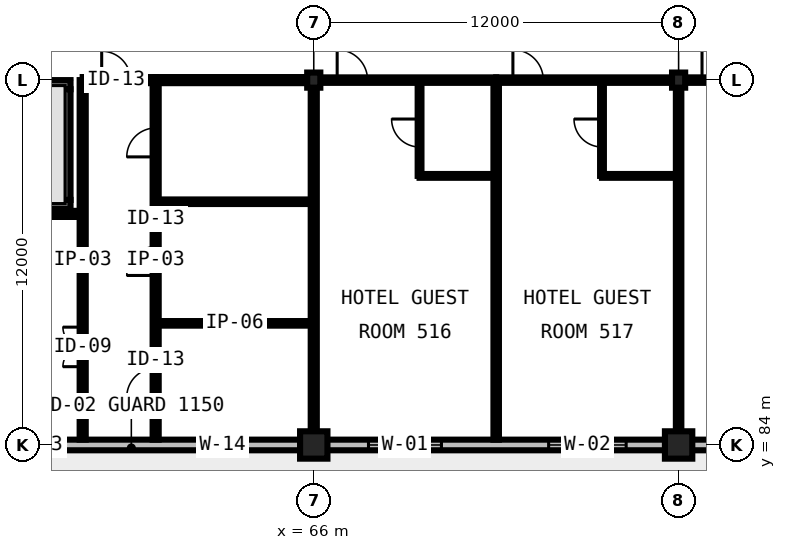
"""IFC4 building model, lengths in metres.
Left out: names, types, materials, properties, quantities, classifications, styles, units other than length and angle.
Written with IfcOpenShell. Run it as: python <this file> out.ifc"""

import sys

from ifc_helpers import new_model, si_unit, direction, frame, frame_2d, origin, origin_2d, place, context, subcontext, project, spatial, rectangle, i_section, extrude, element, fill, save


model = new_model("IFC4")
c1 = context("Model", 3, precision=1e-05, world=origin(), true_north=direction((0.0, 1.0)))
c2 = subcontext(c1, "Body", "Model", "MODEL_VIEW")
j1 = project(units=[si_unit("LENGTHUNIT", "METRE"), si_unit("PLANEANGLEUNIT", "RADIAN")], contexts=[c1])
p1 = place(None, origin())
s1 = spatial("IfcSite", under=j1, at=p1, CompositionType="ELEMENT")
p2 = place(p1, origin())
s2 = spatial("IfcBuilding", under=s1, at=p2, CompositionType="ELEMENT")
p3 = place(p2, frame((0.0, 0.0, 27.6)))
s3 = spatial("IfcBuildingStorey", under=s2, at=p3, CompositionType="ELEMENT", Elevation=27.6)
p4 = place(p3, frame((66.0, 84.0, 0.0), z_axis=(0.0, 0.0, 1.0), x_axis=(1.0, 0.0, 0.0)))
e1 = element("IfcColumn", 1, at=p4, inside=s3, PredefinedType="COLUMN", context=c2, shape_type="SweptSolid", body=[
    extrude(rectangle(XDim=0.9, YDim=0.9, at=origin_2d()), origin(), (0.0, 0.0, 1.0), 3.6),
])
p5 = place(p3, frame((66.0, 96.0, 0.0), z_axis=(0.0, 0.0, 1.0), x_axis=(1.0, 0.0, 0.0)))
e2 = element("IfcColumn", 2, at=p5, inside=s3, PredefinedType="COLUMN", context=c2, shape_type="SweptSolid", body=[
    extrude(i_section(OverallWidth=0.432, OverallDepth=0.498, WebThickness=0.056, FlangeThickness=0.089, FilletRadius=0.031, at=origin_2d()), origin(), (0.0, 0.0, 1.0), 3.6),
])
p6 = place(p3, frame((78.0, 84.0, 0.0), z_axis=(0.0, 0.0, 1.0), x_axis=(1.0, 0.0, 0.0)))
e3 = element("IfcColumn", 3, at=p6, inside=s3, PredefinedType="COLUMN", context=c2, shape_type="SweptSolid", body=[
    extrude(rectangle(XDim=0.9, YDim=0.9, at=origin_2d()), origin(), (0.0, 0.0, 1.0), 3.6),
])
p7 = place(p3, frame((78.0, 96.0, 0.0), z_axis=(0.0, 0.0, 1.0), x_axis=(1.0, 0.0, 0.0)))
e4 = element("IfcColumn", 4, at=p7, inside=s3, PredefinedType="COLUMN", context=c2, shape_type="SweptSolid", body=[
    extrude(i_section(OverallWidth=0.432, OverallDepth=0.498, WebThickness=0.056, FlangeThickness=0.089, FilletRadius=0.031, at=origin_2d()), origin(), (0.0, 0.0, 1.0), 3.6),
])
p8 = place(p3, frame((48.2, 91.91, 0.0), z_axis=(0.0, 0.0, 1.0), x_axis=(1.0, 0.0, 0.0)))
e5 = element("IfcWall", 5, at=p8, inside=s3, PredefinedType="SHEAR", context=c2, shape_type="SweptSolid", body=[
    extrude(rectangle(XDim=9.8, YDim=0.3, at=frame_2d((4.9, 0.0))), origin(), (0.0, 0.0, 1.0), 3.6),
])
p9 = place(p3, frame((58.0, 95.85, 0.0), z_axis=(0.0, 0.0, 1.0), x_axis=(-1.0, 0.0, 0.0)))
e6 = element("IfcWall", 6, at=p9, inside=s3, PredefinedType="SHEAR", context=c2, shape_type="SweptSolid", body=[
    extrude(rectangle(XDim=9.8, YDim=0.3, at=frame_2d((4.9, 0.0))), origin(), (0.0, 0.0, 1.0), 3.6),
])
p10 = place(p9, frame((8.25, 0.0, 0.0)))
e7 = element("IfcOpeningElement", 7, at=p10, cuts=e6, PredefinedType="OPENING", context=c2, shape_type="SweptSolid", body=[
    extrude(rectangle(XDim=1.1, YDim=2.2, at=frame_2d((0.55, 1.1))), frame((0.0, 0.165, 0.0), z_axis=(0.0, -1.0, 0.0), x_axis=(1.0, 0.0, 0.0)), (0.0, 0.0, 1.0), 0.33),
])
p11 = place(p3, frame((57.85, 92.06, 0.0), z_axis=(0.0, 0.0, 1.0), x_axis=(0.0, 1.0, 0.0)))
e8 = element("IfcWall", 8, at=p11, inside=s3, PredefinedType="SHEAR", context=c2, shape_type="SweptSolid", body=[
    extrude(rectangle(XDim=3.64, YDim=0.3, at=frame_2d((1.82, 0.0))), origin(), (0.0, 0.0, 1.0), 3.6),
])
p12 = place(p3, frame((54.0, 84.0, 0.0), z_axis=(0.0, 0.0, 1.0), x_axis=(1.0, 0.0, 0.0)))
e9 = element("IfcWall", 9, at=p12, inside=s3, PredefinedType="STANDARD", context=c2, shape_type="SweptSolid", body=[
    extrude(rectangle(XDim=12.0, YDim=0.35, at=frame_2d((6.0, 0.0))), origin(), (0.0, 0.0, 1.0), 2.486),
])
p13 = place(p12, frame((2.3, 0.0, 1.0)))
e10 = element("IfcOpeningElement", 10, at=p13, cuts=e9, PredefinedType="OPENING", context=c2, shape_type="SweptSolid", body=[
    extrude(rectangle(XDim=1.4, YDim=1.4, at=frame_2d((0.7, 0.7))), frame((0.0, 0.19, 0.0), z_axis=(0.0, -1.0, 0.0), x_axis=(1.0, 0.0, 0.0)), (0.0, 0.0, 1.0), 0.38),
])
p14 = place(p12, frame((8.25, 0.0, 1.0)))
e11 = element("IfcOpeningElement", 11, at=p14, cuts=e9, PredefinedType="OPENING", context=c2, shape_type="SweptSolid", body=[
    extrude(rectangle(XDim=1.5, YDim=1.35, at=frame_2d((0.75, 0.675))), frame((0.0, 0.19, 0.0), z_axis=(0.0, -1.0, 0.0), x_axis=(1.0, 0.0, 0.0)), (0.0, 0.0, 1.0), 0.38),
])
p15 = place(p3, frame((66.0, 84.0, 0.0), z_axis=(0.0, 0.0, 1.0), x_axis=(1.0, 0.0, 0.0)))
e12 = element("IfcWall", 12, at=p15, inside=s3, PredefinedType="STANDARD", context=c2, shape_type="SweptSolid", body=[
    extrude(rectangle(XDim=12.0, YDim=0.35, at=frame_2d((6.0, 0.0))), origin(), (0.0, 0.0, 1.0), 2.486),
])
p16 = place(p15, frame((1.8, 0.0, 0.75)))
e13 = element("IfcOpeningElement", 13, at=p16, cuts=e12, PredefinedType="OPENING", context=c2, shape_type="SweptSolid", body=[
    extrude(rectangle(XDim=2.4, YDim=1.65, at=frame_2d((1.2, 0.825))), frame((0.0, 0.19, 0.0), z_axis=(0.0, -1.0, 0.0), x_axis=(1.0, 0.0, 0.0)), (0.0, 0.0, 1.0), 0.38),
])
p17 = place(p15, frame((7.725, 0.0, 0.75)))
e14 = element("IfcOpeningElement", 14, at=p17, cuts=e12, PredefinedType="OPENING", context=c2, shape_type="SweptSolid", body=[
    extrude(rectangle(XDim=2.55, YDim=1.65, at=frame_2d((1.275, 0.825))), frame((0.0, 0.19, 0.0), z_axis=(0.0, -1.0, 0.0), x_axis=(1.0, 0.0, 0.0)), (0.0, 0.0, 1.0), 0.38),
])
p18 = place(p3, frame((78.0, 84.0, 0.0), z_axis=(0.0, 0.0, 1.0), x_axis=(1.0, 0.0, 0.0)))
e15 = element("IfcWall", 15, at=p18, inside=s3, PredefinedType="STANDARD", context=c2, shape_type="SweptSolid", body=[
    extrude(rectangle(XDim=6.0, YDim=0.35, at=frame_2d((3.0, 0.0))), origin(), (0.0, 0.0, 1.0), 2.486),
])
p19 = place(p18, frame((1.8, 0.0, 0.75)))
e16 = element("IfcOpeningElement", 16, at=p19, cuts=e15, PredefinedType="OPENING", context=c2, shape_type="SweptSolid", body=[
    extrude(rectangle(XDim=2.4, YDim=1.65, at=frame_2d((1.2, 0.825))), frame((0.0, 0.19, 0.0), z_axis=(0.0, -1.0, 0.0), x_axis=(1.0, 0.0, 0.0)), (0.0, 0.0, 1.0), 0.38),
])
p20 = place(p3, frame((58.4, 96.0, 0.0), z_axis=(0.0, 0.0, 1.0), x_axis=(1.0, 0.0, 0.0)))
e17 = element("IfcWall", 17, at=p20, inside=s3, PredefinedType="PARTITIONING", context=c2, shape_type="SweptSolid", body=[
    extrude(rectangle(XDim=2.4, YDim=0.2, at=frame_2d((1.2, 0.0))), origin(), (0.0, 0.0, 1.0), 2.359),
])
p21 = place(p20, frame((0.625, 0.0, 0.0)))
e18 = element("IfcOpeningElement", 18, at=p21, cuts=e17, PredefinedType="OPENING", context=c2, shape_type="SweptSolid", body=[
    extrude(rectangle(XDim=0.95, YDim=2.15, at=frame_2d((0.475, 1.075))), frame((0.0, 0.115, 0.0), z_axis=(0.0, -1.0, 0.0), x_axis=(1.0, 0.0, 0.0)), (0.0, 0.0, 1.0), 0.23),
])
p22 = place(p3, frame((58.4, 84.175, 0.0), z_axis=(0.0, 0.0, 1.0), x_axis=(0.0, 1.0, 0.0)))
e19 = element("IfcWall", 19, at=p22, inside=s3, PredefinedType="PARTITIONING", context=c2, shape_type="SweptSolid", body=[
    extrude(rectangle(XDim=11.825, YDim=0.2, at=frame_2d((5.913, 0.0))), origin(), (0.0, 0.0, 1.0), 3.29),
])
p23 = place(p22, frame((2.4, 0.0, 0.0)))
e20 = element("IfcOpeningElement", 20, at=p23, cuts=e19, PredefinedType="OPENING", context=c2, shape_type="SweptSolid", body=[
    extrude(rectangle(XDim=1.3, YDim=2.2, at=frame_2d((0.65, 1.1))), frame((0.0, 0.115, 0.0), z_axis=(0.0, -1.0, 0.0), x_axis=(1.0, 0.0, 0.0)), (0.0, 0.0, 1.0), 0.23),
])
p24 = place(p3, frame((60.8, 84.175, 0.0), z_axis=(0.0, 0.0, 1.0), x_axis=(0.0, 1.0, 0.0)))
e21 = element("IfcWall", 21, at=p24, inside=s3, PredefinedType="PARTITIONING", context=c2, shape_type="SweptSolid", body=[
    extrude(rectangle(XDim=11.825, YDim=0.2, at=frame_2d((5.913, 0.0))), origin(), (0.0, 0.0, 1.0), 3.29),
])
p25 = place(p24, frame((1.4, 0.0, 0.0)))
e22 = element("IfcOpeningElement", 22, at=p25, cuts=e21, PredefinedType="OPENING", context=c2, shape_type="SweptSolid", body=[
    extrude(rectangle(XDim=0.95, YDim=2.15, at=frame_2d((0.475, 1.075))), frame((0.0, 0.115, 0.0), z_axis=(0.0, -1.0, 0.0), x_axis=(1.0, 0.0, 0.0)), (0.0, 0.0, 1.0), 0.23),
])
p26 = place(p24, frame((5.4, 0.0, 0.0)))
e23 = element("IfcOpeningElement", 23, at=p26, cuts=e21, PredefinedType="OPENING", context=c2, shape_type="SweptSolid", body=[
    extrude(rectangle(XDim=0.95, YDim=2.15, at=frame_2d((0.475, 1.075))), frame((0.0, 0.115, 0.0), z_axis=(0.0, -1.0, 0.0), x_axis=(1.0, 0.0, 0.0)), (0.0, 0.0, 1.0), 0.23),
])
p27 = place(p24, frame((9.3, 0.0, 0.0)))
e24 = element("IfcOpeningElement", 24, at=p27, cuts=e21, PredefinedType="OPENING", context=c2, shape_type="SweptSolid", body=[
    extrude(rectangle(XDim=0.95, YDim=2.15, at=frame_2d((0.475, 1.075))), frame((0.0, 0.115, 0.0), z_axis=(0.0, -1.0, 0.0), x_axis=(1.0, 0.0, 0.0)), (0.0, 0.0, 1.0), 0.23),
])
p28 = place(p3, frame((66.0, 84.175, 0.0), z_axis=(0.0, 0.0, 1.0), x_axis=(0.0, 1.0, 0.0)))
e25 = element("IfcWall", 25, at=p28, inside=s3, PredefinedType="PARTITIONING", context=c2, shape_type="SweptSolid", body=[
    extrude(rectangle(XDim=11.825, YDim=0.2, at=frame_2d((5.913, 0.0))), origin(), (0.0, 0.0, 1.0), 2.59),
])
p29 = place(p3, frame((60.8, 96.0, 0.0), z_axis=(0.0, 0.0, 1.0), x_axis=(1.0, 0.0, 0.0)))
e26 = element("IfcWall", 26, at=p29, inside=s3, PredefinedType="PARTITIONING", context=c2, shape_type="SweptSolid", body=[
    extrude(rectangle(XDim=5.2, YDim=0.2, at=frame_2d((2.6, 0.0))), origin(), (0.0, 0.0, 1.0), 2.359),
])
for number, where, z_axis, x_axis in (
    (27, (60.8, 88.0, 0.0), (0.0, 0.0, 1.0), (1.0, 0.0, 0.0)),
    (28, (60.8, 92.0, 0.0), (0.0, 0.0, 1.0), (1.0, 0.0, 0.0)),
):
    element("IfcWall", number, at=place(p3, frame(where, z_axis=z_axis, x_axis=x_axis)), inside=s3, PredefinedType="PARTITIONING", context=c2, shape_type="SweptSolid", body=[
        extrude(rectangle(XDim=5.2, YDim=0.15, at=frame_2d((2.6, 0.0))), origin(), (0.0, 0.0, 1.0), 3.29),
    ])
p30 = place(p3, frame((48.0, 91.6, 0.0), z_axis=(0.0, 0.0, 1.0), x_axis=(1.0, 0.0, 0.0)))
e29 = element("IfcWall", 29, at=p30, inside=s3, PredefinedType="PARTITIONING", context=c2, shape_type="SweptSolid", body=[
    extrude(rectangle(XDim=10.4, YDim=0.2, at=frame_2d((5.2, 0.0))), origin(), (0.0, 0.0, 1.0), 3.29),
])
p31 = place(p3, frame((66.0, 96.0, 0.0), z_axis=(0.0, 0.0, 1.0), x_axis=(1.0, 0.0, 0.0)))
e30 = element("IfcWall", 30, at=p31, inside=s3, PredefinedType="PARTITIONING", context=c2, shape_type="SweptSolid", body=[
    extrude(rectangle(XDim=6.0, YDim=0.18, at=frame_2d((3.0, 0.0))), origin(), (0.0, 0.0, 1.0), 2.664),
])
p32 = place(p31, frame((0.77, 0.0, 0.0)))
e31 = element("IfcOpeningElement", 31, at=p32, cuts=e30, PredefinedType="OPENING", context=c2, shape_type="SweptSolid", body=[
    extrude(rectangle(XDim=1.0, YDim=2.15, at=frame_2d((0.5, 1.075))), frame((0.0, 0.105, 0.0), z_axis=(0.0, -1.0, 0.0), x_axis=(1.0, 0.0, 0.0)), (0.0, 0.0, 1.0), 0.21),
])
p33 = place(p3, frame((72.0, 84.175, 0.0), z_axis=(0.0, 0.0, 1.0), x_axis=(0.0, 1.0, 0.0)))
e32 = element("IfcWall", 32, at=p33, inside=s3, PredefinedType="PARTITIONING", context=c2, shape_type="SweptSolid", body=[
    extrude(rectangle(XDim=11.825, YDim=0.18, at=frame_2d((5.913, 0.0))), origin(), (0.0, 0.0, 1.0), 3.29),
])
p34 = place(p3, frame((69.48, 92.85, 0.0), z_axis=(0.0, 0.0, 1.0), x_axis=(0.0, 1.0, 0.0)))
e33 = element("IfcWall", 33, at=p34, inside=s3, PredefinedType="PARTITIONING", context=c2, shape_type="SweptSolid", body=[
    extrude(rectangle(XDim=3.06, YDim=0.125, at=frame_2d((1.53, 0.0))), origin(), (0.0, 0.0, 1.0), 3.29),
])
p35 = place(p34, frame((0.95, 0.0, 0.0)))
e34 = element("IfcOpeningElement", 34, at=p35, cuts=e33, PredefinedType="OPENING", context=c2, shape_type="SweptSolid", body=[
    extrude(rectangle(XDim=0.92, YDim=2.1, at=frame_2d((0.46, 1.05))), frame((0.0, 0.077, 0.0), z_axis=(0.0, -1.0, 0.0), x_axis=(1.0, 0.0, 0.0)), (0.0, 0.0, 1.0), 0.155),
])
p36 = place(p3, frame((69.48, 92.85, 0.0), z_axis=(0.0, 0.0, 1.0), x_axis=(1.0, 0.0, 0.0)))
e35 = element("IfcWall", 35, at=p36, inside=s3, PredefinedType="PARTITIONING", context=c2, shape_type="SweptSolid", body=[
    extrude(rectangle(XDim=2.52, YDim=0.125, at=frame_2d((1.26, 0.0))), origin(), (0.0, 0.0, 1.0), 3.29),
])
p37 = place(p3, frame((72.0, 96.0, 0.0), z_axis=(0.0, 0.0, 1.0), x_axis=(1.0, 0.0, 0.0)))
e36 = element("IfcWall", 36, at=p37, inside=s3, PredefinedType="PARTITIONING", context=c2, shape_type="SweptSolid", body=[
    extrude(rectangle(XDim=6.0, YDim=0.18, at=frame_2d((3.0, 0.0))), origin(), (0.0, 0.0, 1.0), 2.664),
])
p38 = place(p37, frame((0.55, 0.0, 0.0)))
e37 = element("IfcOpeningElement", 37, at=p38, cuts=e36, PredefinedType="OPENING", context=c2, shape_type="SweptSolid", body=[
    extrude(rectangle(XDim=1.0, YDim=2.15, at=frame_2d((0.5, 1.075))), frame((0.0, 0.105, 0.0), z_axis=(0.0, -1.0, 0.0), x_axis=(1.0, 0.0, 0.0)), (0.0, 0.0, 1.0), 0.21),
])
p39 = place(p3, frame((78.0, 84.175, 0.0), z_axis=(0.0, 0.0, 1.0), x_axis=(0.0, 1.0, 0.0)))
e38 = element("IfcWall", 38, at=p39, inside=s3, PredefinedType="PARTITIONING", context=c2, shape_type="SweptSolid", body=[
    extrude(rectangle(XDim=11.825, YDim=0.18, at=frame_2d((5.913, 0.0))), origin(), (0.0, 0.0, 1.0), 2.59),
])
p40 = place(p3, frame((75.48, 92.85, 0.0), z_axis=(0.0, 0.0, 1.0), x_axis=(0.0, 1.0, 0.0)))
e39 = element("IfcWall", 39, at=p40, inside=s3, PredefinedType="PARTITIONING", context=c2, shape_type="SweptSolid", body=[
    extrude(rectangle(XDim=3.06, YDim=0.125, at=frame_2d((1.53, 0.0))), origin(), (0.0, 0.0, 1.0), 3.29),
])
p41 = place(p40, frame((0.95, 0.0, 0.0)))
e40 = element("IfcOpeningElement", 40, at=p41, cuts=e39, PredefinedType="OPENING", context=c2, shape_type="SweptSolid", body=[
    extrude(rectangle(XDim=0.92, YDim=2.1, at=frame_2d((0.46, 1.05))), frame((0.0, 0.077, 0.0), z_axis=(0.0, -1.0, 0.0), x_axis=(1.0, 0.0, 0.0)), (0.0, 0.0, 1.0), 0.155),
])
p42 = place(p3, frame((75.48, 92.85, 0.0), z_axis=(0.0, 0.0, 1.0), x_axis=(1.0, 0.0, 0.0)))
e41 = element("IfcWall", 41, at=p42, inside=s3, PredefinedType="PARTITIONING", context=c2, shape_type="SweptSolid", body=[
    extrude(rectangle(XDim=2.52, YDim=0.125, at=frame_2d((1.26, 0.0))), origin(), (0.0, 0.0, 1.0), 3.29),
])
p43 = place(p3, frame((78.0, 96.0, 0.0), z_axis=(0.0, 0.0, 1.0), x_axis=(1.0, 0.0, 0.0)))
e42 = element("IfcWall", 42, at=p43, inside=s3, PredefinedType="PARTITIONING", context=c2, shape_type="SweptSolid", body=[
    extrude(rectangle(XDim=6.0, YDim=0.18, at=frame_2d((3.0, 0.0))), origin(), (0.0, 0.0, 1.0), 2.736),
])
p44 = place(p43, frame((0.77, 0.0, 0.0)))
e43 = element("IfcOpeningElement", 43, at=p44, cuts=e42, PredefinedType="OPENING", context=c2, shape_type="SweptSolid", body=[
    extrude(rectangle(XDim=1.0, YDim=2.15, at=frame_2d((0.5, 1.075))), frame((0.0, 0.105, 0.0), z_axis=(0.0, -1.0, 0.0), x_axis=(1.0, 0.0, 0.0)), (0.0, 0.0, 1.0), 0.21),
])
p45 = place(p13, origin())
e44 = element("IfcWindow", 44, at=p45, inside=s3, PartitioningType="SINGLE_PANEL", PredefinedType="WINDOW", context=c2, shape_type="SweptSolid", body=[
    extrude(rectangle(XDim=1.4, YDim=1.4, at=frame_2d((0.7, 0.7))), frame((0.0, 0.03, 0.0), z_axis=(0.0, -1.0, 0.0), x_axis=(1.0, 0.0, 0.0)), (0.0, 0.0, 1.0), 0.06),
])
fill(e10, e44)
p46 = place(p14, origin())
e45 = element("IfcWindow", 45, at=p46, inside=s3, PartitioningType="SINGLE_PANEL", PredefinedType="WINDOW", context=c2, shape_type="SweptSolid", body=[
    extrude(rectangle(XDim=1.5, YDim=1.35, at=frame_2d((0.75, 0.675))), frame((0.0, 0.03, 0.0), z_axis=(0.0, -1.0, 0.0), x_axis=(1.0, 0.0, 0.0)), (0.0, 0.0, 1.0), 0.06),
])
fill(e11, e45)
p47 = place(p16, origin())
e46 = element("IfcWindow", 46, at=p47, inside=s3, PartitioningType="DOUBLE_PANEL_VERTICAL", PredefinedType="WINDOW", context=c2, shape_type="SweptSolid", body=[
    extrude(rectangle(XDim=2.4, YDim=1.65, at=frame_2d((1.2, 0.825))), frame((0.0, 0.03, 0.0), z_axis=(0.0, -1.0, 0.0), x_axis=(1.0, 0.0, 0.0)), (0.0, 0.0, 1.0), 0.06),
])
fill(e13, e46)
p48 = place(p17, origin())
e47 = element("IfcWindow", 47, at=p48, inside=s3, PartitioningType="DOUBLE_PANEL_VERTICAL", PredefinedType="WINDOW", context=c2, shape_type="SweptSolid", body=[
    extrude(rectangle(XDim=2.55, YDim=1.65, at=frame_2d((1.275, 0.825))), frame((0.0, 0.03, 0.0), z_axis=(0.0, -1.0, 0.0), x_axis=(1.0, 0.0, 0.0)), (0.0, 0.0, 1.0), 0.06),
])
fill(e14, e47)
p49 = place(p21, origin())
e48 = element("IfcDoor", 48, at=p49, inside=s3, OperationType="SINGLE_SWING_LEFT", PredefinedType="DOOR", context=c2, shape_type="SweptSolid", body=[
    extrude(rectangle(XDim=0.95, YDim=2.15, at=frame_2d((0.475, 1.075))), frame((0.0, 0.025, 0.0), z_axis=(0.0, -1.0, 0.0), x_axis=(1.0, 0.0, 0.0)), (0.0, 0.0, 1.0), 0.05),
])
fill(e18, e48)
p50 = place(p23, origin())
e49 = element("IfcDoor", 49, at=p50, inside=s3, OperationType="DOUBLE_DOOR_SINGLE_SWING", PredefinedType="DOOR", context=c2, shape_type="SweptSolid", body=[
    extrude(rectangle(XDim=1.3, YDim=2.2, at=frame_2d((0.65, 1.1))), frame((0.0, 0.025, 0.0), z_axis=(0.0, -1.0, 0.0), x_axis=(1.0, 0.0, 0.0)), (0.0, 0.0, 1.0), 0.05),
])
fill(e20, e49)
p51 = place(p25, origin())
e50 = element("IfcDoor", 50, at=p51, inside=s3, OperationType="SINGLE_SWING_LEFT", PredefinedType="DOOR", context=c2, shape_type="SweptSolid", body=[
    extrude(rectangle(XDim=0.95, YDim=2.15, at=frame_2d((0.475, 1.075))), frame((0.0, 0.025, 0.0), z_axis=(0.0, -1.0, 0.0), x_axis=(1.0, 0.0, 0.0)), (0.0, 0.0, 1.0), 0.05),
])
fill(e22, e50)
p52 = place(p26, origin())
e51 = element("IfcDoor", 51, at=p52, inside=s3, OperationType="SINGLE_SWING_LEFT", PredefinedType="DOOR", context=c2, shape_type="SweptSolid", body=[
    extrude(rectangle(XDim=0.95, YDim=2.15, at=frame_2d((0.475, 1.075))), frame((0.0, 0.025, 0.0), z_axis=(0.0, -1.0, 0.0), x_axis=(1.0, 0.0, 0.0)), (0.0, 0.0, 1.0), 0.05),
])
fill(e23, e51)
p53 = place(p27, origin())
e52 = element("IfcDoor", 52, at=p53, inside=s3, OperationType="SINGLE_SWING_LEFT", PredefinedType="DOOR", context=c2, shape_type="SweptSolid", body=[
    extrude(rectangle(XDim=0.95, YDim=2.15, at=frame_2d((0.475, 1.075))), frame((0.0, 0.025, 0.0), z_axis=(0.0, -1.0, 0.0), x_axis=(1.0, 0.0, 0.0)), (0.0, 0.0, 1.0), 0.05),
])
fill(e24, e52)
p54 = place(p32, origin())
e53 = element("IfcDoor", 53, at=p54, inside=s3, OperationType="SINGLE_SWING_LEFT", PredefinedType="DOOR", context=c2, shape_type="SweptSolid", body=[
    extrude(rectangle(XDim=1.0, YDim=2.15, at=frame_2d((0.5, 1.075))), frame((0.0, 0.025, 0.0), z_axis=(0.0, -1.0, 0.0), x_axis=(1.0, 0.0, 0.0)), (0.0, 0.0, 1.0), 0.05),
])
fill(e31, e53)
p55 = place(p35, origin())
e54 = element("IfcDoor", 54, at=p55, inside=s3, OperationType="SINGLE_SWING_RIGHT", PredefinedType="DOOR", context=c2, shape_type="SweptSolid", body=[
    extrude(rectangle(XDim=0.92, YDim=2.1, at=frame_2d((0.46, 1.05))), frame((0.0, 0.025, 0.0), z_axis=(0.0, -1.0, 0.0), x_axis=(1.0, 0.0, 0.0)), (0.0, 0.0, 1.0), 0.05),
])
fill(e34, e54)
p56 = place(p38, origin())
e55 = element("IfcDoor", 55, at=p56, inside=s3, OperationType="SINGLE_SWING_LEFT", PredefinedType="DOOR", context=c2, shape_type="SweptSolid", body=[
    extrude(rectangle(XDim=1.0, YDim=2.15, at=frame_2d((0.5, 1.075))), frame((0.0, 0.025, 0.0), z_axis=(0.0, -1.0, 0.0), x_axis=(1.0, 0.0, 0.0)), (0.0, 0.0, 1.0), 0.05),
])
fill(e37, e55)
p57 = place(p41, origin())
e56 = element("IfcDoor", 56, at=p57, inside=s3, OperationType="SINGLE_SWING_RIGHT", PredefinedType="DOOR", context=c2, shape_type="SweptSolid", body=[
    extrude(rectangle(XDim=0.92, YDim=2.1, at=frame_2d((0.46, 1.05))), frame((0.0, 0.025, 0.0), z_axis=(0.0, -1.0, 0.0), x_axis=(1.0, 0.0, 0.0)), (0.0, 0.0, 1.0), 0.05),
])
fill(e40, e56)
p58 = place(p44, origin())
e57 = element("IfcDoor", 57, at=p58, inside=s3, OperationType="SINGLE_SWING_LEFT", PredefinedType="DOOR", context=c2, shape_type="SweptSolid", body=[
    extrude(rectangle(XDim=1.0, YDim=2.15, at=frame_2d((0.5, 1.075))), frame((0.0, 0.025, 0.0), z_axis=(0.0, -1.0, 0.0), x_axis=(1.0, 0.0, 0.0)), (0.0, 0.0, 1.0), 0.05),
])
fill(e43, e57)
save(model, sys.argv[1])
